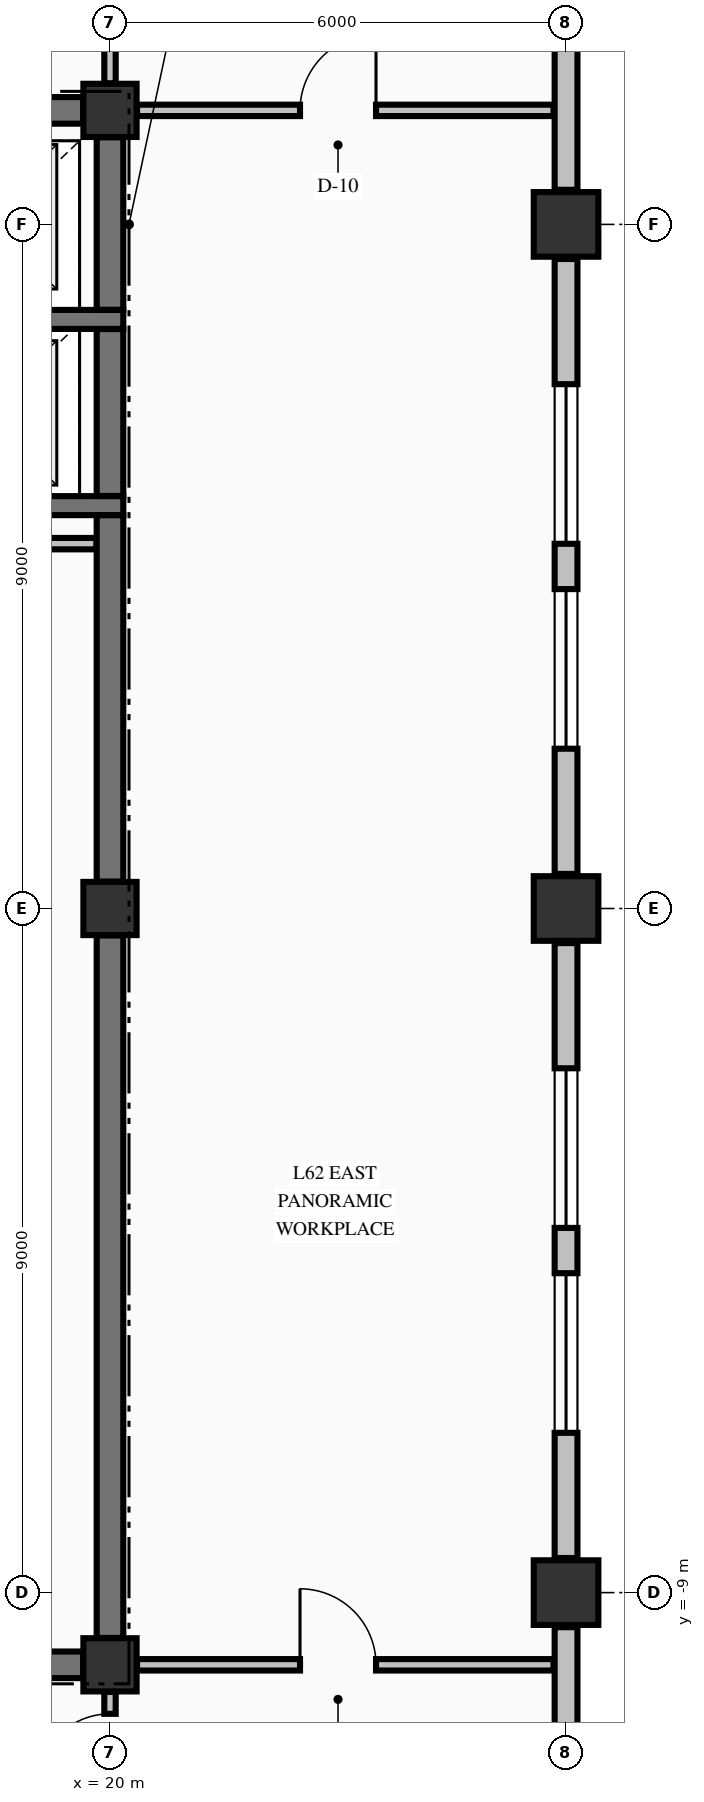
"""IFC4 building model, lengths in metres.
Left out: names, types, materials, properties, quantities, classifications, styles, units other than length and angle.
Written with IfcOpenShell. Run it as: python <this file> out.ifc"""

import sys

from ifc_helpers import new_model, si_unit, direction, frame, frame_2d, origin, origin_2d, place, context, subcontext, project, spatial, rectangle, extrude, element, fill, save


model = new_model("IFC4")
c1 = context("Model", 3, precision=1e-05, world=origin(), true_north=direction((0.0, 1.0)))
c2 = subcontext(c1, "Body", "Model", "MODEL_VIEW")
j1 = project(units=[si_unit("LENGTHUNIT", "METRE"), si_unit("PLANEANGLEUNIT", "RADIAN")], contexts=[c1])
p1 = place(None, origin())
s1 = spatial("IfcSite", under=j1, at=p1, CompositionType="ELEMENT")
p2 = place(p1, origin())
s2 = spatial("IfcBuilding", under=s1, at=p2, CompositionType="ELEMENT")
p3 = place(p2, frame((0.0, 0.0, 236.51)))
s3 = spatial("IfcBuildingStorey", under=s2, at=p3, CompositionType="ELEMENT", Elevation=236.51)
for number, where, z_axis, x_axis in (
    (1, (26.0, -9.0, -0.25), (0.0, 0.0, 1.0), (1.0, 0.0, 0.0)),
    (2, (26.0, 0.0, -0.25), (0.0, 0.0, 1.0), (1.0, 0.0, 0.0)),
    (3, (26.0, 9.0, -0.25), (0.0, 0.0, 1.0), (1.0, 0.0, 0.0)),
):
    element("IfcColumn", number, at=place(p3, frame(where, z_axis=z_axis, x_axis=x_axis)), inside=s3, PredefinedType="COLUMN", context=c2, shape_type="SweptSolid", body=[
        extrude(rectangle(XDim=0.85, YDim=0.85, at=origin_2d()), origin(), (0.0, 0.0, 1.0), 3.23),
    ])
for number, where, z_axis, x_axis in (
    (4, (20.0, -9.95, -0.25), (0.0, 0.0, 1.0), (1.0, 0.0, 0.0)),
    (5, (20.0, 10.5, -0.25), (0.0, 0.0, 1.0), (1.0, 0.0, 0.0)),
    (6, (20.0, 0.0, -0.25), (0.0, 0.0, 1.0), (1.0, 0.0, 0.0)),
):
    element("IfcColumn", number, at=place(p3, frame(where, z_axis=z_axis, x_axis=x_axis)), inside=s3, PredefinedType="COLUMN", context=c2, shape_type="SweptSolid", body=[
        extrude(rectangle(XDim=0.7, YDim=0.7, at=origin_2d()), origin(), (0.0, 0.0, 1.0), 3.23),
    ])
p4 = place(p3, frame((26.0, -17.545, 0.0), z_axis=(0.0, 0.0, 1.0), x_axis=(0.0, 1.0, 0.0)))
e7 = element("IfcWall", 7, at=p4, inside=s3, PredefinedType="STANDARD", context=c2, shape_type="SweptSolid", body=[
    extrude(rectangle(XDim=8.09, YDim=0.3, at=frame_2d((4.045, 0.0))), origin(), (0.0, 0.0, 1.0), 2.372),
])
p5 = place(p3, frame((26.0, -8.545, 0.0), z_axis=(0.0, 0.0, 1.0), x_axis=(0.0, 1.0, 0.0)))
e8 = element("IfcWall", 8, at=p5, inside=s3, PredefinedType="STANDARD", context=c2, shape_type="SweptSolid", body=[
    extrude(rectangle(XDim=8.09, YDim=0.3, at=frame_2d((4.045, 0.0))), origin(), (0.0, 0.0, 1.0), 2.372),
])
p6 = place(p5, frame((1.647, 0.0, 0.7)))
e9 = element("IfcOpeningElement", 9, at=p6, cuts=e8, PredefinedType="OPENING", context=c2, shape_type="SweptSolid", body=[
    extrude(rectangle(XDim=2.1, YDim=1.5, at=frame_2d((1.05, 0.75))), frame((0.0, 0.16, 0.0), z_axis=(0.0, -1.0, 0.0), x_axis=(1.0, 0.0, 0.0)), (0.0, 0.0, 1.0), 0.32),
])
p7 = place(p5, frame((4.343, 0.0, 0.7)))
e10 = element("IfcOpeningElement", 10, at=p7, cuts=e8, PredefinedType="OPENING", context=c2, shape_type="SweptSolid", body=[
    extrude(rectangle(XDim=2.1, YDim=1.5, at=frame_2d((1.05, 0.75))), frame((0.0, 0.16, 0.0), z_axis=(0.0, -1.0, 0.0), x_axis=(1.0, 0.0, 0.0)), (0.0, 0.0, 1.0), 0.32),
])
p8 = place(p3, frame((26.0, 0.455, 0.0), z_axis=(0.0, 0.0, 1.0), x_axis=(0.0, 1.0, 0.0)))
e11 = element("IfcWall", 11, at=p8, inside=s3, PredefinedType="STANDARD", context=c2, shape_type="SweptSolid", body=[
    extrude(rectangle(XDim=8.09, YDim=0.3, at=frame_2d((4.045, 0.0))), origin(), (0.0, 0.0, 1.0), 2.372),
])
p9 = place(p8, frame((1.647, 0.0, 0.7)))
e12 = element("IfcOpeningElement", 12, at=p9, cuts=e11, PredefinedType="OPENING", context=c2, shape_type="SweptSolid", body=[
    extrude(rectangle(XDim=2.1, YDim=1.5, at=frame_2d((1.05, 0.75))), frame((0.0, 0.16, 0.0), z_axis=(0.0, -1.0, 0.0), x_axis=(1.0, 0.0, 0.0)), (0.0, 0.0, 1.0), 0.32),
])
p10 = place(p8, frame((4.343, 0.0, 0.7)))
e13 = element("IfcOpeningElement", 13, at=p10, cuts=e11, PredefinedType="OPENING", context=c2, shape_type="SweptSolid", body=[
    extrude(rectangle(XDim=2.1, YDim=1.5, at=frame_2d((1.05, 0.75))), frame((0.0, 0.16, 0.0), z_axis=(0.0, -1.0, 0.0), x_axis=(1.0, 0.0, 0.0)), (0.0, 0.0, 1.0), 0.32),
])
p11 = place(p3, frame((26.0, 9.455, 0.0), z_axis=(0.0, 0.0, 1.0), x_axis=(0.0, 1.0, 0.0)))
e14 = element("IfcWall", 14, at=p11, inside=s3, PredefinedType="STANDARD", context=c2, shape_type="SweptSolid", body=[
    extrude(rectangle(XDim=8.09, YDim=0.3, at=frame_2d((4.045, 0.0))), origin(), (0.0, 0.0, 1.0), 2.372),
])
p12 = place(p3, frame((14.7, -9.95, 0.0), z_axis=(0.0, 0.0, 1.0), x_axis=(1.0, 0.0, 0.0)))
e15 = element("IfcWall", 15, at=p12, inside=s3, PredefinedType="SHEAR", context=c2, shape_type="SweptSolid", body=[
    extrude(rectangle(XDim=4.946, YDim=0.35, at=frame_2d((2.473, 0.0))), origin(), (0.0, 0.0, 1.0), 2.98),
])
p13 = place(p12, frame((2.125, 0.0, 0.0)))
e16 = element("IfcOpeningElement", 16, at=p13, cuts=e15, PredefinedType="OPENING", context=c2, shape_type="SweptSolid", body=[
    extrude(rectangle(XDim=1.05, YDim=2.15, at=frame_2d((0.525, 1.075))), frame((0.0, 0.185, 0.0), z_axis=(0.0, -1.0, 0.0), x_axis=(1.0, 0.0, 0.0)), (0.0, 0.0, 1.0), 0.37),
])
for number, where, z_axis, x_axis in (
    (17, (17.025, 5.3, 0.0), (0.0, 0.0, 1.0), (1.0, 0.0, 0.0)),
    (18, (17.025, 7.75, 0.0), (0.0, 0.0, 1.0), (1.0, 0.0, 0.0)),
):
    element("IfcWall", number, at=place(p3, frame(where, z_axis=z_axis, x_axis=x_axis)), inside=s3, PredefinedType="SOLIDWALL", context=c2, shape_type="SweptSolid", body=[
        extrude(rectangle(XDim=3.15, YDim=0.25, at=frame_2d((1.575, 0.0))), origin(), (0.0, 0.0, 1.0), 2.98),
    ])
p14 = place(p3, frame((14.7, 10.5, 0.0), z_axis=(0.0, 0.0, 1.0), x_axis=(1.0, 0.0, 0.0)))
e19 = element("IfcWall", 19, at=p14, inside=s3, PredefinedType="SHEAR", context=c2, shape_type="SweptSolid", body=[
    extrude(rectangle(XDim=4.946, YDim=0.35, at=frame_2d((2.473, 0.0))), origin(), (0.0, 0.0, 1.0), 2.98),
])
p15 = place(p14, frame((0.7, 0.0, 0.0)))
e20 = element("IfcOpeningElement", 20, at=p15, cuts=e19, PredefinedType="OPENING", context=c2, shape_type="SweptSolid", body=[
    extrude(rectangle(XDim=1.1, YDim=2.15, at=frame_2d((0.55, 1.075))), frame((0.0, 0.185, 0.0), z_axis=(0.0, -1.0, 0.0), x_axis=(1.0, 0.0, 0.0)), (0.0, 0.0, 1.0), 0.37),
])
p16 = place(p3, frame((20.356, -9.95, 0.0), z_axis=(0.0, 0.0, 1.0), x_axis=(1.0, 0.0, 0.0)))
e21 = element("IfcWall", 21, at=p16, inside=s3, PredefinedType="PARTITIONING", context=c2, shape_type="SweptSolid", body=[
    extrude(rectangle(XDim=5.479, YDim=0.15, at=frame_2d((2.74, 0.0))), origin(), (0.0, 0.0, 1.0), 2.98),
])
p17 = place(p16, frame((2.144, 0.0, 0.0)))
e22 = element("IfcOpeningElement", 22, at=p17, cuts=e21, PredefinedType="OPENING", context=c2, shape_type="SweptSolid", body=[
    extrude(rectangle(XDim=1.0, YDim=2.15, at=frame_2d((0.5, 1.075))), frame((0.0, 0.085, 0.0), z_axis=(0.0, -1.0, 0.0), x_axis=(1.0, 0.0, 0.0)), (0.0, 0.0, 1.0), 0.17),
])
p18 = place(p3, frame((14.878, 4.8, 0.0), z_axis=(0.0, 0.0, 1.0), x_axis=(1.0, 0.0, 0.0)))
e23 = element("IfcWall", 23, at=p18, inside=s3, PredefinedType="PARTITIONING", context=c2, shape_type="SweptSolid", body=[
    extrude(rectangle(XDim=4.944, YDim=0.15, at=frame_2d((2.472, 0.0))), origin(), (0.0, 0.0, 1.0), 2.98),
])
p19 = place(p3, frame((20.356, 10.5, 0.0), z_axis=(0.0, 0.0, 1.0), x_axis=(1.0, 0.0, 0.0)))
e24 = element("IfcWall", 24, at=p19, inside=s3, PredefinedType="PARTITIONING", context=c2, shape_type="SweptSolid", body=[
    extrude(rectangle(XDim=5.479, YDim=0.15, at=frame_2d((2.74, 0.0))), origin(), (0.0, 0.0, 1.0), 2.98),
])
p20 = place(p19, frame((2.144, 0.0, 0.0)))
e25 = element("IfcOpeningElement", 25, at=p20, cuts=e24, PredefinedType="OPENING", context=c2, shape_type="SweptSolid", body=[
    extrude(rectangle(XDim=1.0, YDim=2.15, at=frame_2d((0.5, 1.075))), frame((0.0, 0.085, 0.0), z_axis=(0.0, -1.0, 0.0), x_axis=(1.0, 0.0, 0.0)), (0.0, 0.0, 1.0), 0.17),
])
p21 = place(p3, frame((20.0, -9.596, 0.0), z_axis=(0.0, 0.0, 1.0), x_axis=(0.0, 1.0, 0.0)))
e26 = element("IfcWall", 26, at=p21, inside=s3, PredefinedType="SHEAR", context=c2, shape_type="SweptSolid", body=[
    extrude(rectangle(XDim=9.242, YDim=0.35, at=frame_2d((4.621, 0.0))), origin(), (0.0, 0.0, 1.0), 2.98),
])
p22 = place(p3, frame((20.0, 0.354, 0.0), z_axis=(0.0, 0.0, 1.0), x_axis=(0.0, 1.0, 0.0)))
e27 = element("IfcWall", 27, at=p22, inside=s3, PredefinedType="SHEAR", context=c2, shape_type="SweptSolid", body=[
    extrude(rectangle(XDim=4.819, YDim=0.35, at=frame_2d((2.41, 0.0))), origin(), (0.0, 0.0, 1.0), 2.98),
])
p23 = place(p3, frame((20.0, 5.427, 0.0), z_axis=(0.0, 0.0, 1.0), x_axis=(0.0, 1.0, 0.0)))
e28 = element("IfcWall", 28, at=p23, inside=s3, PredefinedType="SHEAR", context=c2, shape_type="SweptSolid", body=[
    extrude(rectangle(XDim=2.196, YDim=0.35, at=frame_2d((1.098, 0.0))), origin(), (0.0, 0.0, 1.0), 2.98),
])
p24 = place(p3, frame((20.0, 7.877, 0.0), z_axis=(0.0, 0.0, 1.0), x_axis=(0.0, 1.0, 0.0)))
e29 = element("IfcWall", 29, at=p24, inside=s3, PredefinedType="SHEAR", context=c2, shape_type="SweptSolid", body=[
    extrude(rectangle(XDim=2.269, YDim=0.35, at=frame_2d((1.135, 0.0))), origin(), (0.0, 0.0, 1.0), 2.98),
])
p25 = place(p3, frame((20.0, -12.122, 0.0), z_axis=(0.0, 0.0, 1.0), x_axis=(0.0, 1.0, 0.0)))
e30 = element("IfcWall", 30, at=p25, inside=s3, PredefinedType="PARTITIONING", context=c2, shape_type="SweptSolid", body=[
    extrude(rectangle(XDim=1.816, YDim=0.15, at=frame_2d((0.908, 0.0))), origin(), (0.0, 0.0, 1.0), 2.98),
])
p26 = place(p25, frame((0.577, 0.0, 0.0)))
e31 = element("IfcOpeningElement", 31, at=p26, cuts=e30, PredefinedType="OPENING", context=c2, shape_type="SweptSolid", body=[
    extrude(rectangle(XDim=0.95, YDim=2.15, at=frame_2d((0.475, 1.075))), frame((0.0, 0.085, 0.0), z_axis=(0.0, -1.0, 0.0), x_axis=(1.0, 0.0, 0.0)), (0.0, 0.0, 1.0), 0.17),
])
p27 = place(p3, frame((20.0, 10.856, 0.0), z_axis=(0.0, 0.0, 1.0), x_axis=(0.0, 1.0, 0.0)))
e32 = element("IfcWall", 32, at=p27, inside=s3, PredefinedType="PARTITIONING", context=c2, shape_type="SweptSolid", body=[
    extrude(rectangle(XDim=2.416, YDim=0.15, at=frame_2d((1.208, 0.0))), origin(), (0.0, 0.0, 1.0), 2.98),
])
p28 = place(p27, frame((0.599, 0.0, 0.0)))
e33 = element("IfcOpeningElement", 33, at=p28, cuts=e32, PredefinedType="OPENING", context=c2, shape_type="SweptSolid", body=[
    extrude(rectangle(XDim=0.95, YDim=2.15, at=frame_2d((0.475, 1.075))), frame((0.0, 0.085, 0.0), z_axis=(0.0, -1.0, 0.0), x_axis=(1.0, 0.0, 0.0)), (0.0, 0.0, 1.0), 0.17),
])
p29 = place(p6, origin())
e34 = element("IfcWindow", 34, at=p29, inside=s3, PartitioningType="SINGLE_PANEL", PredefinedType="WINDOW", context=c2, shape_type="SweptSolid", body=[
    extrude(rectangle(XDim=2.1, YDim=1.5, at=frame_2d((1.05, 0.75))), frame((0.0, 0.03, 0.0), z_axis=(0.0, -1.0, 0.0), x_axis=(1.0, 0.0, 0.0)), (0.0, 0.0, 1.0), 0.06),
])
fill(e9, e34)
p30 = place(p7, origin())
e35 = element("IfcWindow", 35, at=p30, inside=s3, PartitioningType="SINGLE_PANEL", PredefinedType="WINDOW", context=c2, shape_type="SweptSolid", body=[
    extrude(rectangle(XDim=2.1, YDim=1.5, at=frame_2d((1.05, 0.75))), frame((0.0, 0.03, 0.0), z_axis=(0.0, -1.0, 0.0), x_axis=(1.0, 0.0, 0.0)), (0.0, 0.0, 1.0), 0.06),
])
fill(e10, e35)
p31 = place(p9, origin())
e36 = element("IfcWindow", 36, at=p31, inside=s3, PartitioningType="SINGLE_PANEL", PredefinedType="WINDOW", context=c2, shape_type="SweptSolid", body=[
    extrude(rectangle(XDim=2.1, YDim=1.5, at=frame_2d((1.05, 0.75))), frame((0.0, 0.03, 0.0), z_axis=(0.0, -1.0, 0.0), x_axis=(1.0, 0.0, 0.0)), (0.0, 0.0, 1.0), 0.06),
])
fill(e12, e36)
p32 = place(p10, origin())
e37 = element("IfcWindow", 37, at=p32, inside=s3, PartitioningType="SINGLE_PANEL", PredefinedType="WINDOW", context=c2, shape_type="SweptSolid", body=[
    extrude(rectangle(XDim=2.1, YDim=1.5, at=frame_2d((1.05, 0.75))), frame((0.0, 0.03, 0.0), z_axis=(0.0, -1.0, 0.0), x_axis=(1.0, 0.0, 0.0)), (0.0, 0.0, 1.0), 0.06),
])
fill(e13, e37)
p33 = place(p26, origin())
e38 = element("IfcDoor", 38, at=p33, inside=s3, OperationType="SINGLE_SWING_LEFT", PredefinedType="DOOR", context=c2, shape_type="SweptSolid", body=[
    extrude(rectangle(XDim=0.95, YDim=2.15, at=frame_2d((0.475, 1.075))), frame((0.0, 0.025, 0.0), z_axis=(0.0, -1.0, 0.0), x_axis=(1.0, 0.0, 0.0)), (0.0, 0.0, 1.0), 0.05),
])
fill(e31, e38)
p34 = place(p20, origin())
e39 = element("IfcDoor", 39, at=p34, inside=s3, OperationType="SINGLE_SWING_RIGHT", PredefinedType="DOOR", context=c2, shape_type="SweptSolid", body=[
    extrude(rectangle(XDim=1.0, YDim=2.15, at=frame_2d((0.5, 1.075))), frame((0.0, 0.025, 0.0), z_axis=(0.0, -1.0, 0.0), x_axis=(1.0, 0.0, 0.0)), (0.0, 0.0, 1.0), 0.05),
])
fill(e25, e39)
p35 = place(p17, origin())
e40 = element("IfcDoor", 40, at=p35, inside=s3, OperationType="SINGLE_SWING_LEFT", PredefinedType="DOOR", context=c2, shape_type="SweptSolid", body=[
    extrude(rectangle(XDim=1.0, YDim=2.15, at=frame_2d((0.5, 1.075))), frame((0.0, 0.025, 0.0), z_axis=(0.0, -1.0, 0.0), x_axis=(1.0, 0.0, 0.0)), (0.0, 0.0, 1.0), 0.05),
])
fill(e22, e40)
save(model, sys.argv[1])
